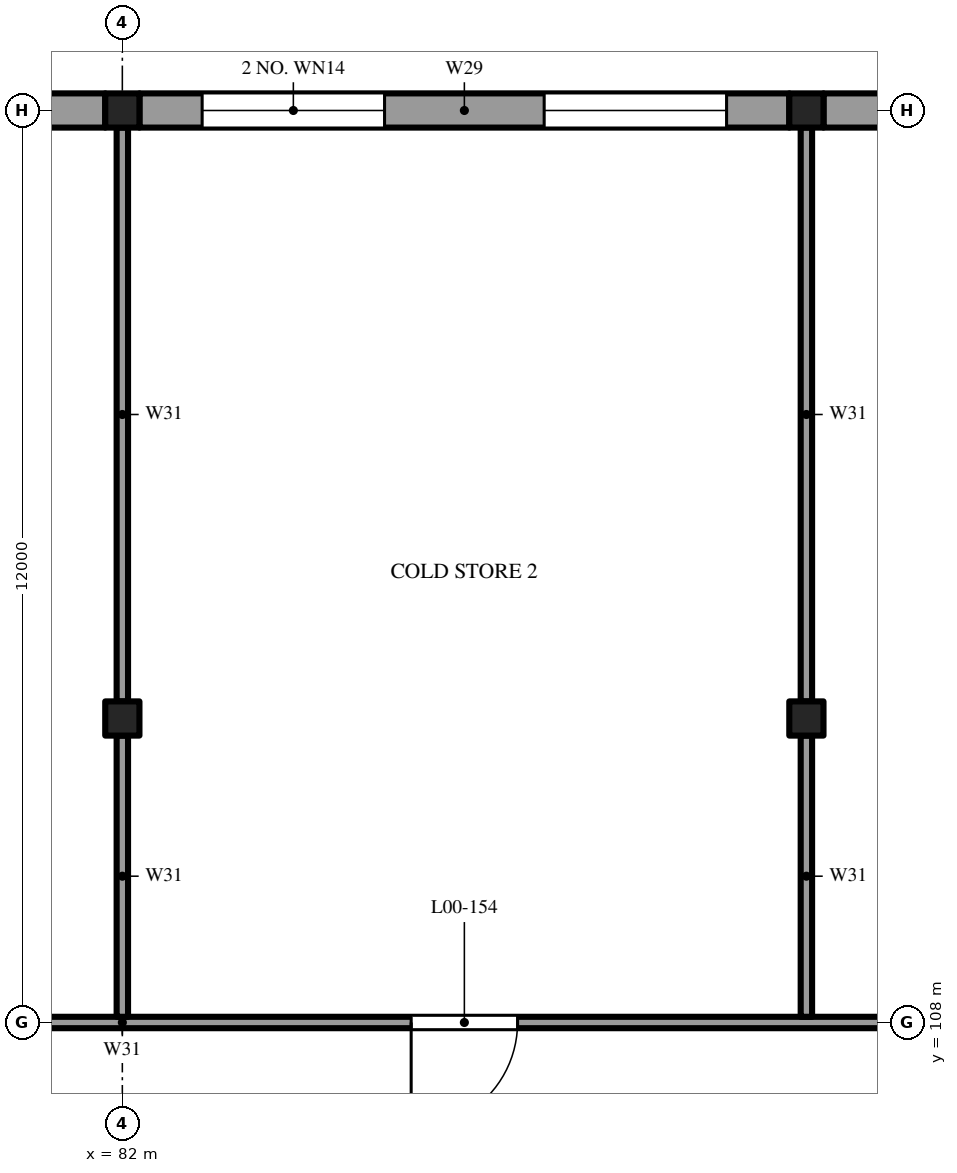
"""IFC4 building model, lengths in metres.
Left out: names, types, materials, properties, quantities, classifications, styles, units other than length and angle.
Written with IfcOpenShell. Run it as: python <this file> out.ifc"""

import sys

from ifc_helpers import new_model, si_unit, direction, frame, frame_2d, origin, origin_2d, place, context, subcontext, project, spatial, rectangle, extrude, element, fill, save


model = new_model("IFC4")
c1 = context("Model", 3, precision=1e-05, world=origin(), true_north=direction((0.0, 1.0)))
c2 = subcontext(c1, "Body", "Model", "MODEL_VIEW")
j1 = project(units=[si_unit("LENGTHUNIT", "METRE"), si_unit("PLANEANGLEUNIT", "RADIAN")], contexts=[c1])
p1 = place(None, origin())
s1 = spatial("IfcSite", under=j1, at=p1, CompositionType="ELEMENT")
p2 = place(p1, origin())
s2 = spatial("IfcBuilding", under=s1, at=p2, CompositionType="ELEMENT")
p3 = place(p2, origin())
s3 = spatial("IfcBuildingStorey", under=s2, at=p3, CompositionType="ELEMENT", Elevation=0.0)
for number, where, z_axis, x_axis in (
    (1, (82.0, 112.0, -0.4), (0.0, 0.0, 1.0), (1.0, 0.0, 0.0)),
    (2, (82.0, 120.0, -0.4), (0.0, 0.0, 1.0), (1.0, 0.0, 0.0)),
    (3, (91.0, 112.0, -0.4), (0.0, 0.0, 1.0), (1.0, 0.0, 0.0)),
    (4, (91.0, 120.0, -0.4), (0.0, 0.0, 1.0), (1.0, 0.0, 0.0)),
):
    element("IfcColumn", number, at=place(p3, frame(where, z_axis=z_axis, x_axis=x_axis)), inside=s3, PredefinedType="COLUMN", context=c2, shape_type="SweptSolid", body=[
        extrude(rectangle(XDim=0.45, YDim=0.45, at=origin_2d()), origin(), (0.0, 0.0, 1.0), 7.6),
    ])
p4 = place(p3, frame((73.0, 108.0, 0.0), z_axis=(0.0, 0.0, 1.0), x_axis=(1.0, 0.0, 0.0)))
e5 = element("IfcWall", 5, at=p4, inside=s3, PredefinedType="PARTITIONING", context=c2, shape_type="SweptSolid", body=[
    extrude(rectangle(XDim=27.0, YDim=0.15, at=frame_2d((13.5, 0.0))), origin(), (0.0, 0.0, 1.0), 6.9),
])
p5 = place(p4, frame((3.8, 0.0, 0.0)))
e6 = element("IfcOpeningElement", 6, at=p5, cuts=e5, PredefinedType="OPENING", context=c2, shape_type="SweptSolid", body=[
    extrude(rectangle(XDim=1.4, YDim=2.2, at=frame_2d((0.7, 1.1))), frame((0.0, 0.085, 0.0), z_axis=(0.0, -1.0, 0.0), x_axis=(1.0, 0.0, 0.0)), (0.0, 0.0, 1.0), 0.17),
])
p6 = place(p4, frame((12.8, 0.0, 0.0)))
e7 = element("IfcOpeningElement", 7, at=p6, cuts=e5, PredefinedType="OPENING", context=c2, shape_type="SweptSolid", body=[
    extrude(rectangle(XDim=1.4, YDim=2.2, at=frame_2d((0.7, 1.1))), frame((0.0, 0.085, 0.0), z_axis=(0.0, -1.0, 0.0), x_axis=(1.0, 0.0, 0.0)), (0.0, 0.0, 1.0), 0.17),
])
p7 = place(p4, frame((21.8, 0.0, 0.0)))
e8 = element("IfcOpeningElement", 8, at=p7, cuts=e5, PredefinedType="OPENING", context=c2, shape_type="SweptSolid", body=[
    extrude(rectangle(XDim=1.4, YDim=2.2, at=frame_2d((0.7, 1.1))), frame((0.0, 0.085, 0.0), z_axis=(0.0, -1.0, 0.0), x_axis=(1.0, 0.0, 0.0)), (0.0, 0.0, 1.0), 0.17),
])
p8 = place(p3, frame((81.775, 120.0, 0.0), z_axis=(0.0, 0.0, 1.0), x_axis=(-1.0, 0.0, 0.0)))
e9 = element("IfcWall", 9, at=p8, inside=s3, PredefinedType="SOLIDWALL", context=c2, shape_type="SweptSolid", body=[
    extrude(rectangle(XDim=8.55, YDim=0.45, at=frame_2d((4.275, 0.0))), origin(), (0.0, 0.0, 1.0), 6.9),
])
p9 = place(p8, frame((5.325, 0.0, 4.4)))
e10 = element("IfcOpeningElement", 10, at=p9, cuts=e9, PredefinedType="OPENING", context=c2, shape_type="SweptSolid", body=[
    extrude(rectangle(XDim=2.4, YDim=1.6, at=frame_2d((1.2, 0.8))), frame((0.0, 0.235, 0.0), z_axis=(0.0, -1.0, 0.0), x_axis=(1.0, 0.0, 0.0)), (0.0, 0.0, 1.0), 0.47),
])
p10 = place(p8, frame((0.825, 0.0, 4.4)))
e11 = element("IfcOpeningElement", 11, at=p10, cuts=e9, PredefinedType="OPENING", context=c2, shape_type="SweptSolid", body=[
    extrude(rectangle(XDim=2.4, YDim=1.6, at=frame_2d((1.2, 0.8))), frame((0.0, 0.235, 0.0), z_axis=(0.0, -1.0, 0.0), x_axis=(1.0, 0.0, 0.0)), (0.0, 0.0, 1.0), 0.47),
])
p11 = place(p3, frame((90.775, 120.0, 0.0), z_axis=(0.0, 0.0, 1.0), x_axis=(-1.0, 0.0, 0.0)))
e12 = element("IfcWall", 12, at=p11, inside=s3, PredefinedType="SOLIDWALL", context=c2, shape_type="SweptSolid", body=[
    extrude(rectangle(XDim=8.55, YDim=0.45, at=frame_2d((4.275, 0.0))), origin(), (0.0, 0.0, 1.0), 6.9),
])
p12 = place(p11, frame((5.325, 0.0, 4.4)))
e13 = element("IfcOpeningElement", 13, at=p12, cuts=e12, PredefinedType="OPENING", context=c2, shape_type="SweptSolid", body=[
    extrude(rectangle(XDim=2.4, YDim=1.6, at=frame_2d((1.2, 0.8))), frame((0.0, 0.235, 0.0), z_axis=(0.0, -1.0, 0.0), x_axis=(1.0, 0.0, 0.0)), (0.0, 0.0, 1.0), 0.47),
])
p13 = place(p11, frame((0.825, 0.0, 4.4)))
e14 = element("IfcOpeningElement", 14, at=p13, cuts=e12, PredefinedType="OPENING", context=c2, shape_type="SweptSolid", body=[
    extrude(rectangle(XDim=2.4, YDim=1.6, at=frame_2d((1.2, 0.8))), frame((0.0, 0.235, 0.0), z_axis=(0.0, -1.0, 0.0), x_axis=(1.0, 0.0, 0.0)), (0.0, 0.0, 1.0), 0.47),
])
p14 = place(p3, frame((99.775, 120.0, 0.0), z_axis=(0.0, 0.0, 1.0), x_axis=(-1.0, 0.0, 0.0)))
e15 = element("IfcWall", 15, at=p14, inside=s3, PredefinedType="SOLIDWALL", context=c2, shape_type="SweptSolid", body=[
    extrude(rectangle(XDim=8.55, YDim=0.45, at=frame_2d((4.275, 0.0))), origin(), (0.0, 0.0, 1.0), 6.9),
])
p15 = place(p14, frame((5.325, 0.0, 4.4)))
e16 = element("IfcOpeningElement", 16, at=p15, cuts=e15, PredefinedType="OPENING", context=c2, shape_type="SweptSolid", body=[
    extrude(rectangle(XDim=2.4, YDim=1.6, at=frame_2d((1.2, 0.8))), frame((0.0, 0.235, 0.0), z_axis=(0.0, -1.0, 0.0), x_axis=(1.0, 0.0, 0.0)), (0.0, 0.0, 1.0), 0.47),
])
p16 = place(p14, frame((0.825, 0.0, 4.4)))
e17 = element("IfcOpeningElement", 17, at=p16, cuts=e15, PredefinedType="OPENING", context=c2, shape_type="SweptSolid", body=[
    extrude(rectangle(XDim=2.4, YDim=1.6, at=frame_2d((1.2, 0.8))), frame((0.0, 0.235, 0.0), z_axis=(0.0, -1.0, 0.0), x_axis=(1.0, 0.0, 0.0)), (0.0, 0.0, 1.0), 0.47),
])
p17 = place(p3, frame((82.0, 108.075, 0.0), z_axis=(0.0, 0.0, 1.0), x_axis=(0.0, 1.0, 0.0)))
e18 = element("IfcWall", 18, at=p17, inside=s3, PredefinedType="PARTITIONING", context=c2, shape_type="SweptSolid", body=[
    extrude(rectangle(XDim=3.7, YDim=0.15, at=frame_2d((1.85, 0.0))), origin(), (0.0, 0.0, 1.0), 6.9),
])
p18 = place(p3, frame((82.0, 112.225, 0.0), z_axis=(0.0, 0.0, 1.0), x_axis=(0.0, 1.0, 0.0)))
e19 = element("IfcWall", 19, at=p18, inside=s3, PredefinedType="PARTITIONING", context=c2, shape_type="SweptSolid", body=[
    extrude(rectangle(XDim=7.55, YDim=0.15, at=frame_2d((3.775, 0.0))), origin(), (0.0, 0.0, 1.0), 6.9),
])
p19 = place(p3, frame((91.0, 108.075, 0.0), z_axis=(0.0, 0.0, 1.0), x_axis=(0.0, 1.0, 0.0)))
e20 = element("IfcWall", 20, at=p19, inside=s3, PredefinedType="PARTITIONING", context=c2, shape_type="SweptSolid", body=[
    extrude(rectangle(XDim=3.7, YDim=0.15, at=frame_2d((1.85, 0.0))), origin(), (0.0, 0.0, 1.0), 6.9),
])
p20 = place(p3, frame((91.0, 112.225, 0.0), z_axis=(0.0, 0.0, 1.0), x_axis=(0.0, 1.0, 0.0)))
e21 = element("IfcWall", 21, at=p20, inside=s3, PredefinedType="PARTITIONING", context=c2, shape_type="SweptSolid", body=[
    extrude(rectangle(XDim=7.55, YDim=0.15, at=frame_2d((3.775, 0.0))), origin(), (0.0, 0.0, 1.0), 6.9),
])
p21 = place(p6, frame((1.4, 0.0, 0.0), z_axis=(0.0, 0.0, 1.0), x_axis=(-1.0, 0.0, 0.0)))
e22 = element("IfcDoor", 22, at=p21, inside=s3, OperationType="SINGLE_SWING_LEFT", PredefinedType="DOOR", context=c2, shape_type="SweptSolid", body=[
    extrude(rectangle(XDim=1.4, YDim=2.2, at=frame_2d((0.7, 1.1))), frame((0.0, 0.025, 0.0), z_axis=(0.0, -1.0, 0.0), x_axis=(1.0, 0.0, 0.0)), (0.0, 0.0, 1.0), 0.05),
])
fill(e7, e22)
p22 = place(p12, origin())
e23 = element("IfcWindow", 23, at=p22, inside=s3, PartitioningType="SINGLE_PANEL", PredefinedType="WINDOW", context=c2, shape_type="SweptSolid", body=[
    extrude(rectangle(XDim=2.4, YDim=1.6, at=frame_2d((1.2, 0.8))), frame((0.0, 0.215, 0.0), z_axis=(0.0, -1.0, 0.0), x_axis=(1.0, 0.0, 0.0)), (0.0, 0.0, 1.0), 0.06),
])
fill(e13, e23)
p23 = place(p13, origin())
e24 = element("IfcWindow", 24, at=p23, inside=s3, PartitioningType="SINGLE_PANEL", PredefinedType="WINDOW", context=c2, shape_type="SweptSolid", body=[
    extrude(rectangle(XDim=2.4, YDim=1.6, at=frame_2d((1.2, 0.8))), frame((0.0, 0.215, 0.0), z_axis=(0.0, -1.0, 0.0), x_axis=(1.0, 0.0, 0.0)), (0.0, 0.0, 1.0), 0.06),
])
fill(e14, e24)
save(model, sys.argv[1])
